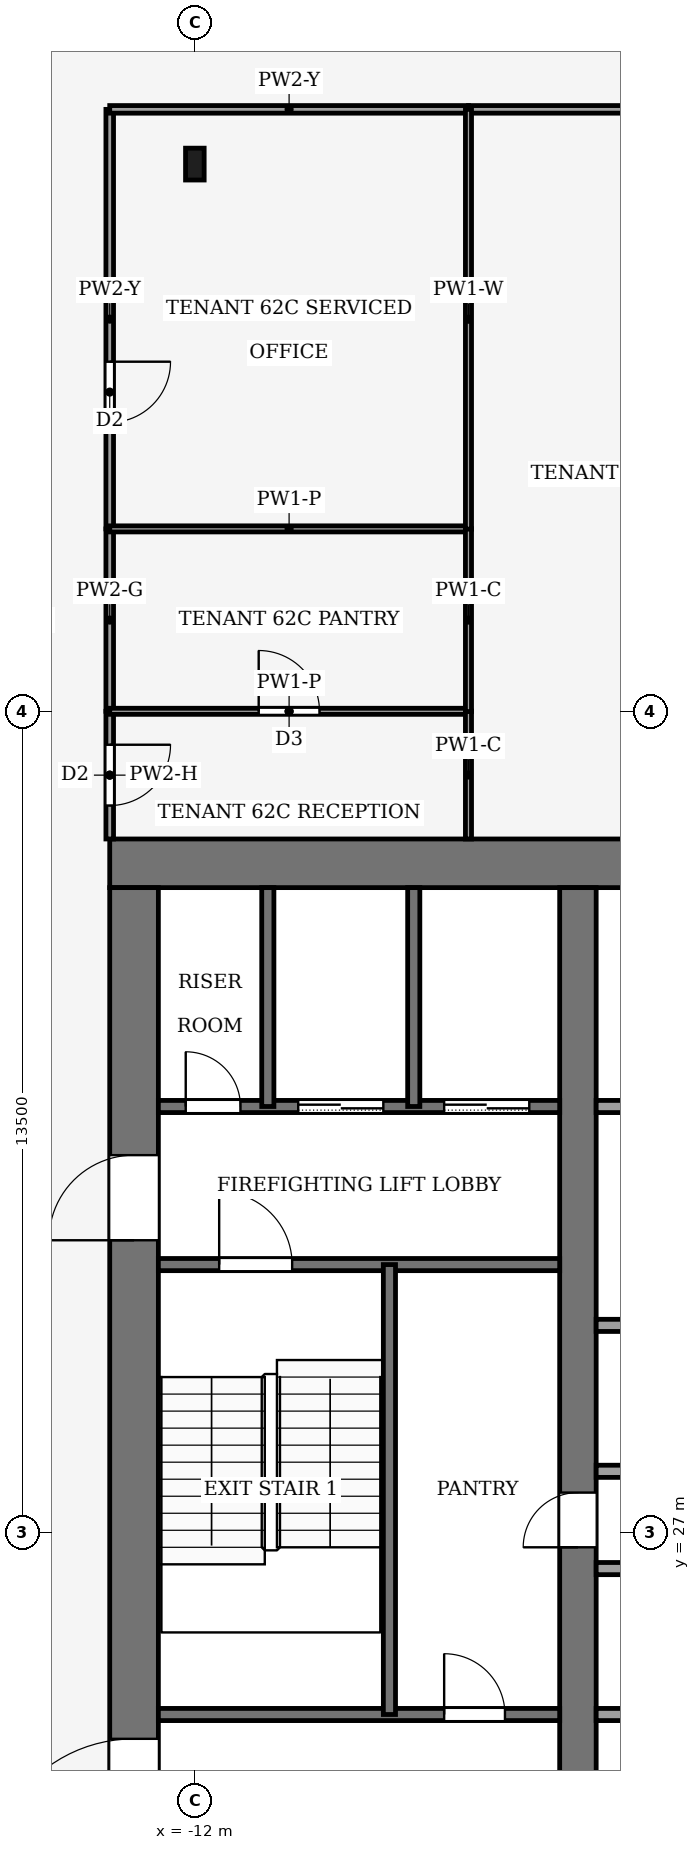
"""IFC4 building model, lengths in metres.
Left out: names, types, materials, properties, quantities, classifications, styles, units other than length and angle.
Written with IfcOpenShell. Run it as: python <this file> out.ifc"""

import sys

from ifc_helpers import new_model, si_unit, direction, frame, frame_2d, origin, origin_2d, place, context, subcontext, project, spatial, rectangle, i_section, extrude, element, fill, save


model = new_model("IFC4")
c1 = context("Model", 3, precision=1e-05, world=origin(), true_north=direction((0.0, 1.0)))
c2 = subcontext(c1, "Body", "Model", "MODEL_VIEW")
j1 = project(units=[si_unit("LENGTHUNIT", "METRE"), si_unit("PLANEANGLEUNIT", "RADIAN")], contexts=[c1])
p1 = place(None, origin())
s1 = spatial("IfcSite", under=j1, at=p1, CompositionType="ELEMENT")
p2 = place(p1, origin())
s2 = spatial("IfcBuilding", under=s1, at=p2, CompositionType="ELEMENT")
p3 = place(p2, frame((0.0, 0.0, 270.0)))
s3 = spatial("IfcBuildingStorey", under=s2, at=p3, CompositionType="ELEMENT", Elevation=270.0)
p4 = place(p3, frame((-13.4, 38.0, -0.13), z_axis=(0.0, 0.0, 1.0), x_axis=(1.0, 0.0, 0.0)))
e1 = element("IfcWall", 1, at=p4, inside=s3, PredefinedType="SHEAR", context=c2, shape_type="SweptSolid", body=[
    extrude(rectangle(XDim=26.8, YDim=0.8, at=frame_2d((13.4, 0.0))), origin(), (0.0, 0.0, 1.0), 4.0),
])
p5 = place(p3, frame((-13.0, 18.4, -0.13), z_axis=(0.0, 0.0, 1.0), x_axis=(0.0, 1.0, 0.0)))
e2 = element("IfcWall", 2, at=p5, inside=s3, PredefinedType="SHEAR", context=c2, shape_type="SweptSolid", body=[
    extrude(rectangle(XDim=19.2, YDim=0.8, at=frame_2d((9.6, 0.0))), origin(), (0.0, 0.0, 1.0), 4.0),
])
p6 = place(p5, frame((2.8, 0.0, 0.13)))
e3 = element("IfcOpeningElement", 3, at=p6, cuts=e2, PredefinedType="OPENING", context=c2, shape_type="SweptSolid", body=[
    extrude(rectangle(XDim=2.4, YDim=2.4, at=frame_2d((1.2, 1.2))), frame((0.0, 0.41, 0.0), z_axis=(0.0, -1.0, 0.0), x_axis=(1.0, 0.0, 0.0)), (0.0, 0.0, 1.0), 0.82),
])
p7 = place(p5, frame((13.4, 0.0, 0.13)))
e4 = element("IfcOpeningElement", 4, at=p7, cuts=e2, PredefinedType="OPENING", context=c2, shape_type="SweptSolid", body=[
    extrude(rectangle(XDim=1.4, YDim=2.2, at=frame_2d((0.7, 1.1))), frame((0.0, 0.41, 0.0), z_axis=(0.0, -1.0, 0.0), x_axis=(1.0, 0.0, 0.0)), (0.0, 0.0, 1.0), 0.82),
])
p8 = place(p3, frame((-5.7, 18.4, -0.13), z_axis=(0.0, 0.0, 1.0), x_axis=(0.0, 1.0, 0.0)))
e5 = element("IfcWall", 5, at=p8, inside=s3, PredefinedType="SHEAR", context=c2, shape_type="SweptSolid", body=[
    extrude(rectangle(XDim=19.2, YDim=0.6, at=frame_2d((9.6, 0.0))), origin(), (0.0, 0.0, 1.0), 4.0),
])
p9 = place(p8, frame((8.35, 0.0, 0.13)))
e6 = element("IfcOpeningElement", 6, at=p9, cuts=e5, PredefinedType="OPENING", context=c2, shape_type="SweptSolid", body=[
    extrude(rectangle(XDim=0.9, YDim=2.1, at=frame_2d((0.45, 1.05))), frame((0.0, 0.31, 0.0), z_axis=(0.0, -1.0, 0.0), x_axis=(1.0, 0.0, 0.0)), (0.0, 0.0, 1.0), 0.62),
])
p10 = place(p3, frame((-12.0, 49.5, 0.0), z_axis=(0.0, 0.0, 1.0), x_axis=(1.0, 0.0, 0.0)))
e7 = element("IfcColumn", 7, at=p10, inside=s3, PredefinedType="COLUMN", context=c2, shape_type="SweptSolid", body=[
    extrude(i_section(OverallWidth=0.306, OverallDepth=0.524, WebThickness=0.012, FlangeThickness=0.04, FilletRadius=0.027, at=origin_2d()), origin(), (0.0, 0.0, 1.0), 4.0),
])
p11 = place(p3, frame((-12.6, 24.0, 0.0), z_axis=(0.0, 0.0, 1.0), x_axis=(1.0, 0.0, 0.0)))
e8 = element("IfcWall", 8, at=p11, inside=s3, PredefinedType="PARTITIONING", context=c2, shape_type="SweptSolid", body=[
    extrude(rectangle(XDim=6.6, YDim=0.2, at=frame_2d((3.3, 0.0))), origin(), (0.0, 0.0, 1.0), 3.87),
])
p12 = place(p11, frame((4.7, 0.0, 0.0)))
e9 = element("IfcOpeningElement", 9, at=p12, cuts=e8, PredefinedType="OPENING", context=c2, shape_type="SweptSolid", body=[
    extrude(rectangle(XDim=1.0, YDim=2.1, at=frame_2d((0.5, 1.05))), frame((0.0, 0.11, 0.0), z_axis=(0.0, -1.0, 0.0), x_axis=(1.0, 0.0, 0.0)), (0.0, 0.0, 1.0), 0.22),
])
p13 = place(p3, frame((-5.4, 24.0, 0.0), z_axis=(0.0, 0.0, 1.0), x_axis=(1.0, 0.0, 0.0)))
e10 = element("IfcWall", 10, at=p13, inside=s3, PredefinedType="PARTITIONING", context=c2, shape_type="SweptSolid", body=[
    extrude(rectangle(XDim=10.8, YDim=0.2, at=frame_2d((5.4, 0.0))), origin(), (0.0, 0.0, 1.0), 3.87),
])
p14 = place(p13, frame((0.75, 0.0, 0.0)))
e11 = element("IfcOpeningElement", 11, at=p14, cuts=e10, PredefinedType="OPENING", context=c2, shape_type="SweptSolid", body=[
    extrude(rectangle(XDim=1.2, YDim=2.2, at=frame_2d((0.6, 1.1))), frame((0.0, 0.11, 0.0), z_axis=(0.0, -1.0, 0.0), x_axis=(1.0, 0.0, 0.0)), (0.0, 0.0, 1.0), 0.22),
])
p15 = place(p13, frame((3.45, 0.0, 0.0)))
e12 = element("IfcOpeningElement", 12, at=p15, cuts=e10, PredefinedType="OPENING", context=c2, shape_type="SweptSolid", body=[
    extrude(rectangle(XDim=1.2, YDim=2.2, at=frame_2d((0.6, 1.1))), frame((0.0, 0.11, 0.0), z_axis=(0.0, -1.0, 0.0), x_axis=(1.0, 0.0, 0.0)), (0.0, 0.0, 1.0), 0.22),
])
p16 = place(p13, frame((6.15, 0.0, 0.0)))
e13 = element("IfcOpeningElement", 13, at=p16, cuts=e10, PredefinedType="OPENING", context=c2, shape_type="SweptSolid", body=[
    extrude(rectangle(XDim=1.2, YDim=2.2, at=frame_2d((0.6, 1.1))), frame((0.0, 0.11, 0.0), z_axis=(0.0, -1.0, 0.0), x_axis=(1.0, 0.0, 0.0)), (0.0, 0.0, 1.0), 0.22),
])
p17 = place(p13, frame((8.85, 0.0, 0.0)))
e14 = element("IfcOpeningElement", 14, at=p17, cuts=e10, PredefinedType="OPENING", context=c2, shape_type="SweptSolid", body=[
    extrude(rectangle(XDim=1.2, YDim=2.2, at=frame_2d((0.6, 1.1))), frame((0.0, 0.11, 0.0), z_axis=(0.0, -1.0, 0.0), x_axis=(1.0, 0.0, 0.0)), (0.0, 0.0, 1.0), 0.22),
])
for number, where, z_axis, x_axis in (
    (15, (-5.4, 26.4, 0.0), (0.0, 0.0, 1.0), (1.0, 0.0, 0.0)),
    (16, (-5.4, 28.0, 0.0), (0.0, 0.0, 1.0), (1.0, 0.0, 0.0)),
):
    element("IfcWall", number, at=place(p3, frame(where, z_axis=z_axis, x_axis=x_axis)), inside=s3, PredefinedType="PARTITIONING", context=c2, shape_type="SweptSolid", body=[
        extrude(rectangle(XDim=10.8, YDim=0.2, at=frame_2d((5.4, 0.0))), origin(), (0.0, 0.0, 1.0), 3.87),
    ])
p18 = place(p3, frame((-5.4, 30.4, 0.0), z_axis=(0.0, 0.0, 1.0), x_axis=(1.0, 0.0, 0.0)))
e17 = element("IfcWall", 17, at=p18, inside=s3, PredefinedType="PARTITIONING", context=c2, shape_type="SweptSolid", body=[
    extrude(rectangle(XDim=10.8, YDim=0.2, at=frame_2d((5.4, 0.0))), origin(), (0.0, 0.0, 1.0), 3.87),
])
p19 = place(p18, frame((2.632, 0.0, 0.0)))
e18 = element("IfcOpeningElement", 18, at=p19, cuts=e17, PredefinedType="OPENING", context=c2, shape_type="SweptSolid", body=[
    extrude(rectangle(XDim=1.0, YDim=2.1, at=frame_2d((0.5, 1.05))), frame((0.0, 0.11, 0.0), z_axis=(0.0, -1.0, 0.0), x_axis=(1.0, 0.0, 0.0)), (0.0, 0.0, 1.0), 0.22),
])
p20 = place(p18, frame((8.032, 0.0, 0.0)))
e19 = element("IfcOpeningElement", 19, at=p20, cuts=e17, PredefinedType="OPENING", context=c2, shape_type="SweptSolid", body=[
    extrude(rectangle(XDim=1.0, YDim=2.1, at=frame_2d((0.5, 1.05))), frame((0.0, 0.11, 0.0), z_axis=(0.0, -1.0, 0.0), x_axis=(1.0, 0.0, 0.0)), (0.0, 0.0, 1.0), 0.22),
])
p21 = place(p3, frame((-12.6, 31.4, 0.0), z_axis=(0.0, 0.0, 1.0), x_axis=(1.0, 0.0, 0.0)))
e20 = element("IfcWall", 20, at=p21, inside=s3, PredefinedType="PARTITIONING", context=c2, shape_type="SweptSolid", body=[
    extrude(rectangle(XDim=6.6, YDim=0.2, at=frame_2d((3.3, 0.0))), origin(), (0.0, 0.0, 1.0), 3.87),
])
p22 = place(p21, frame((1.0, 0.0, 0.0)))
e21 = element("IfcOpeningElement", 21, at=p22, cuts=e20, PredefinedType="OPENING", context=c2, shape_type="SweptSolid", body=[
    extrude(rectangle(XDim=1.2, YDim=2.2, at=frame_2d((0.6, 1.1))), frame((0.0, 0.11, 0.0), z_axis=(0.0, -1.0, 0.0), x_axis=(1.0, 0.0, 0.0)), (0.0, 0.0, 1.0), 0.22),
])
p23 = place(p3, frame((-12.6, 34.0, 0.0), z_axis=(0.0, 0.0, 1.0), x_axis=(1.0, 0.0, 0.0)))
e22 = element("IfcWall", 22, at=p23, inside=s3, PredefinedType="PARTITIONING", context=c2, shape_type="SweptSolid", body=[
    extrude(rectangle(XDim=6.6, YDim=0.2, at=frame_2d((3.3, 0.0))), origin(), (0.0, 0.0, 1.0), 3.87),
])
p24 = place(p23, frame((4.7, 0.0, 0.0)))
e23 = element("IfcOpeningElement", 23, at=p24, cuts=e22, PredefinedType="OPENING", context=c2, shape_type="SweptSolid", body=[
    extrude(rectangle(XDim=1.4, YDim=2.2, at=frame_2d((0.7, 1.1))), frame((0.0, 0.11, 0.0), z_axis=(0.0, -1.0, 0.0), x_axis=(1.0, 0.0, 0.0)), (0.0, 0.0, 1.0), 0.22),
])
p25 = place(p23, frame((2.3, 0.0, 0.0)))
e24 = element("IfcOpeningElement", 24, at=p25, cuts=e22, PredefinedType="OPENING", context=c2, shape_type="SweptSolid", body=[
    extrude(rectangle(XDim=1.4, YDim=2.2, at=frame_2d((0.7, 1.1))), frame((0.0, 0.11, 0.0), z_axis=(0.0, -1.0, 0.0), x_axis=(1.0, 0.0, 0.0)), (0.0, 0.0, 1.0), 0.22),
])
p26 = place(p23, frame((0.45, 0.0, 0.0)))
e25 = element("IfcOpeningElement", 25, at=p26, cuts=e22, PredefinedType="OPENING", context=c2, shape_type="SweptSolid", body=[
    extrude(rectangle(XDim=0.9, YDim=2.1, at=frame_2d((0.45, 1.05))), frame((0.0, 0.11, 0.0), z_axis=(0.0, -1.0, 0.0), x_axis=(1.0, 0.0, 0.0)), (0.0, 0.0, 1.0), 0.22),
])
p27 = place(p3, frame((-5.4, 34.0, 0.0), z_axis=(0.0, 0.0, 1.0), x_axis=(1.0, 0.0, 0.0)))
e26 = element("IfcWall", 26, at=p27, inside=s3, PredefinedType="PARTITIONING", context=c2, shape_type="SweptSolid", body=[
    extrude(rectangle(XDim=10.8, YDim=0.2, at=frame_2d((5.4, 0.0))), origin(), (0.0, 0.0, 1.0), 3.87),
])
p28 = place(p27, frame((6.15, 0.0, 0.0)))
e27 = element("IfcOpeningElement", 27, at=p28, cuts=e26, PredefinedType="OPENING", context=c2, shape_type="SweptSolid", body=[
    extrude(rectangle(XDim=1.2, YDim=2.2, at=frame_2d((0.6, 1.1))), frame((0.0, 0.11, 0.0), z_axis=(0.0, -1.0, 0.0), x_axis=(1.0, 0.0, 0.0)), (0.0, 0.0, 1.0), 0.22),
])
p29 = place(p27, frame((8.95, 0.0, 0.0)))
e28 = element("IfcOpeningElement", 28, at=p29, cuts=e26, PredefinedType="OPENING", context=c2, shape_type="SweptSolid", body=[
    extrude(rectangle(XDim=1.0, YDim=2.1, at=frame_2d((0.5, 1.05))), frame((0.0, 0.11, 0.0), z_axis=(0.0, -1.0, 0.0), x_axis=(1.0, 0.0, 0.0)), (0.0, 0.0, 1.0), 0.22),
])
p30 = place(p3, frame((-10.8, 34.0, 0.0), z_axis=(0.0, 0.0, 1.0), x_axis=(0.0, 1.0, 0.0)))
e29 = element("IfcWall", 29, at=p30, inside=s3, PredefinedType="PARTITIONING", context=c2, shape_type="SweptSolid", body=[
    extrude(rectangle(XDim=3.6, YDim=0.2, at=frame_2d((1.8, 0.0))), origin(), (0.0, 0.0, 1.0), 3.87),
])
p31 = place(p3, frame((-8.8, 24.0, 0.0), z_axis=(0.0, 0.0, 1.0), x_axis=(0.0, 1.0, 0.0)))
e30 = element("IfcWall", 30, at=p31, inside=s3, PredefinedType="PARTITIONING", context=c2, shape_type="SweptSolid", body=[
    extrude(rectangle(XDim=7.4, YDim=0.2, at=frame_2d((3.7, 0.0))), origin(), (0.0, 0.0, 1.0), 3.87),
])
p32 = place(p3, frame((-8.4, 34.0, 0.0), z_axis=(0.0, 0.0, 1.0), x_axis=(0.0, 1.0, 0.0)))
e31 = element("IfcWall", 31, at=p32, inside=s3, PredefinedType="PARTITIONING", context=c2, shape_type="SweptSolid", body=[
    extrude(rectangle(XDim=3.6, YDim=0.2, at=frame_2d((1.8, 0.0))), origin(), (0.0, 0.0, 1.0), 3.87),
])
p33 = place(p3, frame((-13.4, 40.5, 0.0), z_axis=(0.0, 0.0, 1.0), x_axis=(0.0, -1.0, 0.0)))
e32 = element("IfcWall", 32, at=p33, inside=s3, PredefinedType="PARTITIONING", context=c2, shape_type="SweptSolid", body=[
    extrude(rectangle(XDim=2.1, YDim=0.125, at=frame_2d((1.05, 0.0))), origin(), (0.0, 0.0, 1.0), 3.14),
])
p34 = place(p33, frame((0.55, 0.0, 0.0)))
e33 = element("IfcOpeningElement", 33, at=p34, cuts=e32, PredefinedType="OPENING", context=c2, shape_type="SweptSolid", body=[
    extrude(rectangle(XDim=1.0, YDim=2.1, at=frame_2d((0.5, 1.05))), frame((0.0, 0.073, 0.0), z_axis=(0.0, -1.0, 0.0), x_axis=(1.0, 0.0, 0.0)), (0.0, 0.0, 1.0), 0.145),
])
p35 = place(p3, frame((-13.4, 40.5, 0.0), z_axis=(0.0, 0.0, 1.0), x_axis=(0.0, 1.0, 0.0)))
e34 = element("IfcWall", 34, at=p35, inside=s3, PredefinedType="PARTITIONING", context=c2, shape_type="SweptSolid", body=[
    extrude(rectangle(XDim=3.0, YDim=0.125, at=frame_2d((1.5, 0.0))), origin(), (0.0, 0.0, 1.0), 3.87),
])
p36 = place(p3, frame((-13.4, 50.4, 0.0), z_axis=(0.0, 0.0, 1.0), x_axis=(0.0, -1.0, 0.0)))
e35 = element("IfcWall", 35, at=p36, inside=s3, PredefinedType="PARTITIONING", context=c2, shape_type="SweptSolid", body=[
    extrude(rectangle(XDim=6.9, YDim=0.125, at=frame_2d((3.45, 0.0))), origin(), (0.0, 0.0, 1.0), 3.24),
])
p37 = place(p36, frame((4.15, 0.0, 0.0)))
e36 = element("IfcOpeningElement", 36, at=p37, cuts=e35, PredefinedType="OPENING", context=c2, shape_type="SweptSolid", body=[
    extrude(rectangle(XDim=1.0, YDim=2.1, at=frame_2d((0.5, 1.05))), frame((0.0, 0.073, 0.0), z_axis=(0.0, -1.0, 0.0), x_axis=(1.0, 0.0, 0.0)), (0.0, 0.0, 1.0), 0.145),
])
p38 = place(p3, frame((-7.5, 50.4, 0.0), z_axis=(0.0, 0.0, 1.0), x_axis=(-1.0, 0.0, 0.0)))
e37 = element("IfcWall", 37, at=p38, inside=s3, PredefinedType="PARTITIONING", context=c2, shape_type="SweptSolid", body=[
    extrude(rectangle(XDim=5.9, YDim=0.125, at=frame_2d((2.95, 0.0))), origin(), (0.0, 0.0, 1.0), 3.24),
])
p39 = place(p3, frame((0.0, 50.4, 0.0), z_axis=(0.0, 0.0, 1.0), x_axis=(-1.0, 0.0, 0.0)))
e38 = element("IfcWall", 38, at=p39, inside=s3, PredefinedType="PARTITIONING", context=c2, shape_type="SweptSolid", body=[
    extrude(rectangle(XDim=7.5, YDim=0.125, at=frame_2d((3.75, 0.0))), origin(), (0.0, 0.0, 1.0), 3.24),
])
p40 = place(p39, frame((3.65, 0.0, 0.0)))
e39 = element("IfcOpeningElement", 39, at=p40, cuts=e38, PredefinedType="OPENING", context=c2, shape_type="SweptSolid", body=[
    extrude(rectangle(XDim=1.0, YDim=2.1, at=frame_2d((0.5, 1.05))), frame((0.0, 0.073, 0.0), z_axis=(0.0, -1.0, 0.0), x_axis=(1.0, 0.0, 0.0)), (0.0, 0.0, 1.0), 0.145),
])
p41 = place(p3, frame((-13.4, 40.5, 0.0), z_axis=(0.0, 0.0, 1.0), x_axis=(1.0, 0.0, 0.0)))
e40 = element("IfcWall", 40, at=p41, inside=s3, PredefinedType="PARTITIONING", context=c2, shape_type="SweptSolid", body=[
    extrude(rectangle(XDim=5.9, YDim=0.1, at=frame_2d((2.95, 0.0))), origin(), (0.0, 0.0, 1.0), 3.44),
])
p42 = place(p41, frame((2.45, 0.0, 0.0)))
e41 = element("IfcOpeningElement", 41, at=p42, cuts=e40, PredefinedType="OPENING", context=c2, shape_type="SweptSolid", body=[
    extrude(rectangle(XDim=1.0, YDim=2.1, at=frame_2d((0.5, 1.05))), frame((0.0, 0.06, 0.0), z_axis=(0.0, -1.0, 0.0), x_axis=(1.0, 0.0, 0.0)), (0.0, 0.0, 1.0), 0.12),
])
p43 = place(p3, frame((-7.5, 38.4, 0.0), z_axis=(0.0, 0.0, 1.0), x_axis=(0.0, 1.0, 0.0)))
e42 = element("IfcWall", 42, at=p43, inside=s3, PredefinedType="PARTITIONING", context=c2, shape_type="SweptSolid", body=[
    extrude(rectangle(XDim=2.104, YDim=0.1, at=frame_2d((1.052, 0.0))), origin(), (0.0, 0.0, 1.0), 3.87),
])
p44 = place(p3, frame((-7.5, 43.5, 0.0), z_axis=(0.0, 0.0, 1.0), x_axis=(-1.0, 0.0, 0.0)))
e43 = element("IfcWall", 43, at=p44, inside=s3, PredefinedType="PARTITIONING", context=c2, shape_type="SweptSolid", body=[
    extrude(rectangle(XDim=5.9, YDim=0.1, at=frame_2d((2.95, 0.0))), origin(), (0.0, 0.0, 1.0), 3.44),
])
p45 = place(p3, frame((-7.5, 40.496, 0.0), z_axis=(0.0, 0.0, 1.0), x_axis=(0.0, 1.0, 0.0)))
e44 = element("IfcWall", 44, at=p45, inside=s3, PredefinedType="PARTITIONING", context=c2, shape_type="SweptSolid", body=[
    extrude(rectangle(XDim=3.008, YDim=0.1, at=frame_2d((1.504, 0.0))), origin(), (0.0, 0.0, 1.0), 3.87),
])
p46 = place(p3, frame((-7.5, 43.496, 0.0), z_axis=(0.0, 0.0, 1.0), x_axis=(0.0, 1.0, 0.0)))
e45 = element("IfcWall", 45, at=p46, inside=s3, PredefinedType="PARTITIONING", context=c2, shape_type="SweptSolid", body=[
    extrude(rectangle(XDim=6.904, YDim=0.1, at=frame_2d((3.452, 0.0))), origin(), (0.0, 0.0, 1.0), 3.24),
])
p47 = place(p24, origin())
e46 = element("IfcDoor", 46, at=p47, inside=s3, OperationType="SLIDING_TO_LEFT", PredefinedType="DOOR", context=c2, shape_type="SweptSolid", body=[
    extrude(rectangle(XDim=1.4, YDim=2.2, at=frame_2d((0.7, 1.1))), frame((0.0, 0.025, 0.0), z_axis=(0.0, -1.0, 0.0), x_axis=(1.0, 0.0, 0.0)), (0.0, 0.0, 1.0), 0.05),
])
fill(e23, e46)
p48 = place(p25, origin())
e47 = element("IfcDoor", 47, at=p48, inside=s3, OperationType="SLIDING_TO_LEFT", PredefinedType="DOOR", context=c2, shape_type="SweptSolid", body=[
    extrude(rectangle(XDim=1.4, YDim=2.2, at=frame_2d((0.7, 1.1))), frame((0.0, 0.025, 0.0), z_axis=(0.0, -1.0, 0.0), x_axis=(1.0, 0.0, 0.0)), (0.0, 0.0, 1.0), 0.05),
])
fill(e24, e47)
p49 = place(p26, origin())
e48 = element("IfcDoor", 48, at=p49, inside=s3, OperationType="SINGLE_SWING_RIGHT", PredefinedType="DOOR", context=c2, shape_type="SweptSolid", body=[
    extrude(rectangle(XDim=0.9, YDim=2.1, at=frame_2d((0.45, 1.05))), frame((0.0, 0.025, 0.0), z_axis=(0.0, -1.0, 0.0), x_axis=(1.0, 0.0, 0.0)), (0.0, 0.0, 1.0), 0.05),
])
fill(e25, e48)
p50 = place(p12, origin())
e49 = element("IfcDoor", 49, at=p50, inside=s3, OperationType="SINGLE_SWING_LEFT", PredefinedType="DOOR", context=c2, shape_type="SweptSolid", body=[
    extrude(rectangle(XDim=1.0, YDim=2.1, at=frame_2d((0.5, 1.05))), frame((0.0, 0.025, 0.0), z_axis=(0.0, -1.0, 0.0), x_axis=(1.0, 0.0, 0.0)), (0.0, 0.0, 1.0), 0.05),
])
fill(e9, e49)
p51 = place(p9, origin())
e50 = element("IfcDoor", 50, at=p51, inside=s3, OperationType="SINGLE_SWING_RIGHT", PredefinedType="DOOR", context=c2, shape_type="SweptSolid", body=[
    extrude(rectangle(XDim=0.9, YDim=2.1, at=frame_2d((0.45, 1.05))), frame((0.0, 0.025, 0.0), z_axis=(0.0, -1.0, 0.0), x_axis=(1.0, 0.0, 0.0)), (0.0, 0.0, 1.0), 0.05),
])
fill(e6, e50)
p52 = place(p22, origin())
e51 = element("IfcDoor", 51, at=p52, inside=s3, OperationType="SINGLE_SWING_RIGHT", PredefinedType="DOOR", context=c2, shape_type="SweptSolid", body=[
    extrude(rectangle(XDim=1.2, YDim=2.2, at=frame_2d((0.6, 1.1))), frame((0.0, 0.025, 0.0), z_axis=(0.0, -1.0, 0.0), x_axis=(1.0, 0.0, 0.0)), (0.0, 0.0, 1.0), 0.05),
])
fill(e21, e51)
p53 = place(p6, origin())
e52 = element("IfcDoor", 52, at=p53, inside=s3, OperationType="DOUBLE_DOOR_SINGLE_SWING", PredefinedType="DOOR", context=c2, shape_type="SweptSolid", body=[
    extrude(rectangle(XDim=2.4, YDim=2.4, at=frame_2d((1.2, 1.2))), frame((0.0, 0.025, 0.0), z_axis=(0.0, -1.0, 0.0), x_axis=(1.0, 0.0, 0.0)), (0.0, 0.0, 1.0), 0.05),
])
fill(e3, e52)
p54 = place(p7, origin())
e53 = element("IfcDoor", 53, at=p54, inside=s3, OperationType="SINGLE_SWING_RIGHT", PredefinedType="DOOR", context=c2, shape_type="SweptSolid", body=[
    extrude(rectangle(XDim=1.4, YDim=2.2, at=frame_2d((0.7, 1.1))), frame((0.0, 0.025, 0.0), z_axis=(0.0, -1.0, 0.0), x_axis=(1.0, 0.0, 0.0)), (0.0, 0.0, 1.0), 0.05),
])
fill(e4, e53)
p55 = place(p34, origin())
e54 = element("IfcDoor", 54, at=p55, inside=s3, OperationType="SINGLE_SWING_RIGHT", PredefinedType="DOOR", context=c2, shape_type="SweptSolid", body=[
    extrude(rectangle(XDim=1.0, YDim=2.1, at=frame_2d((0.5, 1.05))), frame((0.0, 0.025, 0.0), z_axis=(0.0, -1.0, 0.0), x_axis=(1.0, 0.0, 0.0)), (0.0, 0.0, 1.0), 0.05),
])
fill(e33, e54)
p56 = place(p37, origin())
e55 = element("IfcDoor", 55, at=p56, inside=s3, OperationType="SINGLE_SWING_RIGHT", PredefinedType="DOOR", context=c2, shape_type="SweptSolid", body=[
    extrude(rectangle(XDim=1.0, YDim=2.1, at=frame_2d((0.5, 1.05))), frame((0.0, 0.025, 0.0), z_axis=(0.0, -1.0, 0.0), x_axis=(1.0, 0.0, 0.0)), (0.0, 0.0, 1.0), 0.05),
])
fill(e36, e55)
p57 = place(p42, origin())
e56 = element("IfcDoor", 56, at=p57, inside=s3, OperationType="SINGLE_SWING_LEFT", PredefinedType="DOOR", context=c2, shape_type="SweptSolid", body=[
    extrude(rectangle(XDim=1.0, YDim=2.1, at=frame_2d((0.5, 1.05))), frame((0.0, 0.025, 0.0), z_axis=(0.0, -1.0, 0.0), x_axis=(1.0, 0.0, 0.0)), (0.0, 0.0, 1.0), 0.05),
])
fill(e41, e56)
save(model, sys.argv[1])
